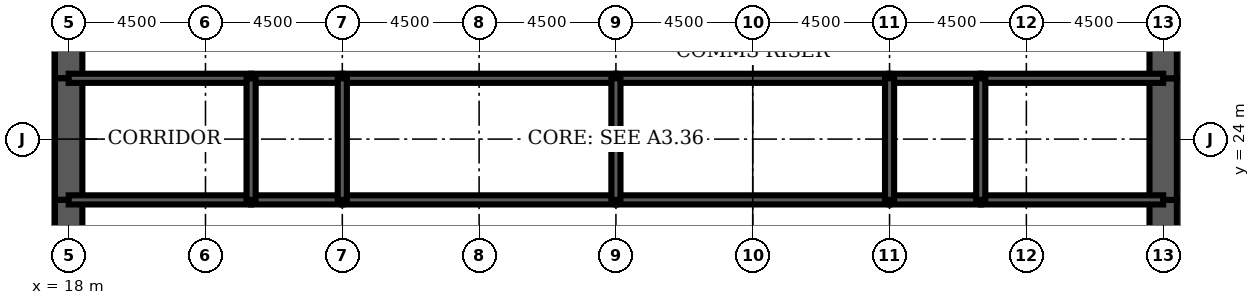
"""IFC4 building model, lengths in metres.
Left out: names, types, materials, properties, quantities, classifications, styles, units other than length and angle.
Written with IfcOpenShell. Run it as: python <this file> out.ifc"""

import sys

from ifc_helpers import new_model, si_unit, direction, frame, frame_2d, origin, place, context, subcontext, project, spatial, rectangle, extrude, element, fill, save


model = new_model("IFC4")
c1 = context("Model", 3, precision=1e-05, world=origin(), true_north=direction((0.0, 1.0)))
c2 = subcontext(c1, "Body", "Model", "MODEL_VIEW")
j1 = project(units=[si_unit("LENGTHUNIT", "METRE"), si_unit("PLANEANGLEUNIT", "RADIAN")], contexts=[c1])
p1 = place(None, origin())
s1 = spatial("IfcSite", under=j1, at=p1, CompositionType="ELEMENT")
p2 = place(p1, origin())
s2 = spatial("IfcBuilding", under=s1, at=p2, CompositionType="ELEMENT")
p3 = place(p2, frame((0.0, 0.0, 155.1)))
s3 = spatial("IfcBuildingStorey", under=s2, at=p3, CompositionType="ELEMENT", Elevation=155.1)
p4 = place(p3, frame((18.0, 28.8, 0.0), z_axis=(0.0, 0.0, 1.0), x_axis=(0.0, -1.0, 0.0)))
e1 = element("IfcWall", 1, at=p4, inside=s3, PredefinedType="SHEAR", context=c2, shape_type="SweptSolid", body=[
    extrude(rectangle(XDim=2.8, YDim=0.9, at=frame_2d((1.4, 0.0))), origin(), (0.0, 0.0, 1.0), 4.2),
])
p5 = place(p4, frame((0.4, 0.0, 0.0)))
e2 = element("IfcOpeningElement", 2, at=p5, cuts=e1, PredefinedType="OPENING", context=c2, shape_type="SweptSolid", body=[
    extrude(rectangle(XDim=1.8, YDim=2.1, at=frame_2d((0.9, 1.05))), frame((0.0, 0.46, 0.0), z_axis=(0.0, -1.0, 0.0), x_axis=(1.0, 0.0, 0.0)), (0.0, 0.0, 1.0), 0.92),
])
p6 = place(p3, frame((18.0, 26.0, 0.0), z_axis=(0.0, 0.0, 1.0), x_axis=(0.0, -1.0, 0.0)))
e3 = element("IfcWall", 3, at=p6, inside=s3, PredefinedType="SHEAR", context=c2, shape_type="SweptSolid", body=[
    extrude(rectangle(XDim=4.0, YDim=0.9, at=frame_2d((2.0, 0.0))), origin(), (0.0, 0.0, 1.0), 4.2),
])
p7 = place(p3, frame((18.0, 22.0, 0.0), z_axis=(0.0, 0.0, 1.0), x_axis=(0.0, -1.0, 0.0)))
e4 = element("IfcWall", 4, at=p7, inside=s3, PredefinedType="SHEAR", context=c2, shape_type="SweptSolid", body=[
    extrude(rectangle(XDim=2.8, YDim=0.9, at=frame_2d((1.4, 0.0))), origin(), (0.0, 0.0, 1.0), 4.2),
])
p8 = place(p7, frame((0.6, 0.0, 0.0)))
e5 = element("IfcOpeningElement", 5, at=p8, cuts=e4, PredefinedType="OPENING", context=c2, shape_type="SweptSolid", body=[
    extrude(rectangle(XDim=1.8, YDim=2.1, at=frame_2d((0.9, 1.05))), frame((0.0, 0.46, 0.0), z_axis=(0.0, -1.0, 0.0), x_axis=(1.0, 0.0, 0.0)), (0.0, 0.0, 1.0), 0.92),
])
p9 = place(p3, frame((54.0, 19.2, 0.0), z_axis=(0.0, 0.0, 1.0), x_axis=(0.0, 1.0, 0.0)))
e6 = element("IfcWall", 6, at=p9, inside=s3, PredefinedType="SHEAR", context=c2, shape_type="SweptSolid", body=[
    extrude(rectangle(XDim=2.8, YDim=0.9, at=frame_2d((1.4, 0.0))), origin(), (0.0, 0.0, 1.0), 4.2),
])
p10 = place(p9, frame((0.4, 0.0, 0.0)))
e7 = element("IfcOpeningElement", 7, at=p10, cuts=e6, PredefinedType="OPENING", context=c2, shape_type="SweptSolid", body=[
    extrude(rectangle(XDim=1.8, YDim=2.1, at=frame_2d((0.9, 1.05))), frame((0.0, 0.46, 0.0), z_axis=(0.0, -1.0, 0.0), x_axis=(1.0, 0.0, 0.0)), (0.0, 0.0, 1.0), 0.92),
])
p11 = place(p3, frame((54.0, 22.0, 0.0), z_axis=(0.0, 0.0, 1.0), x_axis=(0.0, 1.0, 0.0)))
e8 = element("IfcWall", 8, at=p11, inside=s3, PredefinedType="SHEAR", context=c2, shape_type="SweptSolid", body=[
    extrude(rectangle(XDim=4.0, YDim=0.9, at=frame_2d((2.0, 0.0))), origin(), (0.0, 0.0, 1.0), 4.2),
])
p12 = place(p3, frame((54.0, 26.0, 0.0), z_axis=(0.0, 0.0, 1.0), x_axis=(0.0, 1.0, 0.0)))
e9 = element("IfcWall", 9, at=p12, inside=s3, PredefinedType="SHEAR", context=c2, shape_type="SweptSolid", body=[
    extrude(rectangle(XDim=2.8, YDim=0.9, at=frame_2d((1.4, 0.0))), origin(), (0.0, 0.0, 1.0), 4.2),
])
p13 = place(p12, frame((0.6, 0.0, 0.0)))
e10 = element("IfcOpeningElement", 10, at=p13, cuts=e9, PredefinedType="OPENING", context=c2, shape_type="SweptSolid", body=[
    extrude(rectangle(XDim=1.8, YDim=2.1, at=frame_2d((0.9, 1.05))), frame((0.0, 0.46, 0.0), z_axis=(0.0, -1.0, 0.0), x_axis=(1.0, 0.0, 0.0)), (0.0, 0.0, 1.0), 0.92),
])
p14 = place(p3, frame((18.0, 22.0, 0.0), z_axis=(0.0, 0.0, 1.0), x_axis=(1.0, 0.0, 0.0)))
e11 = element("IfcWall", 11, at=p14, inside=s3, PredefinedType="SOLIDWALL", context=c2, shape_type="SweptSolid", body=[
    extrude(rectangle(XDim=6.0, YDim=0.3, at=frame_2d((3.0, 0.0))), origin(), (0.0, 0.0, 1.0), 4.2),
])
p15 = place(p14, frame((2.0, 0.0, 0.0)))
e12 = element("IfcOpeningElement", 12, at=p15, cuts=e11, PredefinedType="OPENING", context=c2, shape_type="SweptSolid", body=[
    extrude(rectangle(XDim=1.0, YDim=2.1, at=frame_2d((0.5, 1.05))), frame((0.0, 0.16, 0.0), z_axis=(0.0, -1.0, 0.0), x_axis=(1.0, 0.0, 0.0)), (0.0, 0.0, 1.0), 0.32),
])
p16 = place(p3, frame((24.0, 22.0, 0.0), z_axis=(0.0, 0.0, 1.0), x_axis=(1.0, 0.0, 0.0)))
e13 = element("IfcWall", 13, at=p16, inside=s3, PredefinedType="SOLIDWALL", context=c2, shape_type="SweptSolid", body=[
    extrude(rectangle(XDim=3.0, YDim=0.3, at=frame_2d((1.5, 0.0))), origin(), (0.0, 0.0, 1.0), 4.2),
])
p17 = place(p16, frame((1.0, 0.0, 0.0)))
e14 = element("IfcOpeningElement", 14, at=p17, cuts=e13, PredefinedType="OPENING", context=c2, shape_type="SweptSolid", body=[
    extrude(rectangle(XDim=1.0, YDim=2.1, at=frame_2d((0.5, 1.05))), frame((0.0, 0.16, 0.0), z_axis=(0.0, -1.0, 0.0), x_axis=(1.0, 0.0, 0.0)), (0.0, 0.0, 1.0), 0.32),
])
p18 = place(p3, frame((27.0, 22.0, 0.0), z_axis=(0.0, 0.0, 1.0), x_axis=(1.0, 0.0, 0.0)))
e15 = element("IfcWall", 15, at=p18, inside=s3, PredefinedType="SOLIDWALL", context=c2, shape_type="SweptSolid", body=[
    extrude(rectangle(XDim=9.0, YDim=0.3, at=frame_2d((4.5, 0.0))), origin(), (0.0, 0.0, 1.0), 4.2),
])
p19 = place(p18, frame((4.0, 0.0, 0.0)))
e16 = element("IfcOpeningElement", 16, at=p19, cuts=e15, PredefinedType="OPENING", context=c2, shape_type="SweptSolid", body=[
    extrude(rectangle(XDim=1.0, YDim=2.1, at=frame_2d((0.5, 1.05))), frame((0.0, 0.16, 0.0), z_axis=(0.0, -1.0, 0.0), x_axis=(1.0, 0.0, 0.0)), (0.0, 0.0, 1.0), 0.32),
])
p20 = place(p3, frame((36.0, 22.0, 0.0), z_axis=(0.0, 0.0, 1.0), x_axis=(1.0, 0.0, 0.0)))
e17 = element("IfcWall", 17, at=p20, inside=s3, PredefinedType="SOLIDWALL", context=c2, shape_type="SweptSolid", body=[
    extrude(rectangle(XDim=9.0, YDim=0.3, at=frame_2d((4.5, 0.0))), origin(), (0.0, 0.0, 1.0), 4.2),
])
p21 = place(p20, frame((4.0, 0.0, 0.0)))
e18 = element("IfcOpeningElement", 18, at=p21, cuts=e17, PredefinedType="OPENING", context=c2, shape_type="SweptSolid", body=[
    extrude(rectangle(XDim=1.0, YDim=2.1, at=frame_2d((0.5, 1.05))), frame((0.0, 0.16, 0.0), z_axis=(0.0, -1.0, 0.0), x_axis=(1.0, 0.0, 0.0)), (0.0, 0.0, 1.0), 0.32),
])
p22 = place(p3, frame((45.0, 22.0, 0.0), z_axis=(0.0, 0.0, 1.0), x_axis=(1.0, 0.0, 0.0)))
e19 = element("IfcWall", 19, at=p22, inside=s3, PredefinedType="SOLIDWALL", context=c2, shape_type="SweptSolid", body=[
    extrude(rectangle(XDim=3.0, YDim=0.3, at=frame_2d((1.5, 0.0))), origin(), (0.0, 0.0, 1.0), 4.2),
])
p23 = place(p22, frame((1.0, 0.0, 0.0)))
e20 = element("IfcOpeningElement", 20, at=p23, cuts=e19, PredefinedType="OPENING", context=c2, shape_type="SweptSolid", body=[
    extrude(rectangle(XDim=1.0, YDim=2.1, at=frame_2d((0.5, 1.05))), frame((0.0, 0.16, 0.0), z_axis=(0.0, -1.0, 0.0), x_axis=(1.0, 0.0, 0.0)), (0.0, 0.0, 1.0), 0.32),
])
p24 = place(p3, frame((48.0, 22.0, 0.0), z_axis=(0.0, 0.0, 1.0), x_axis=(1.0, 0.0, 0.0)))
e21 = element("IfcWall", 21, at=p24, inside=s3, PredefinedType="SOLIDWALL", context=c2, shape_type="SweptSolid", body=[
    extrude(rectangle(XDim=6.0, YDim=0.3, at=frame_2d((3.0, 0.0))), origin(), (0.0, 0.0, 1.0), 4.2),
])
p25 = place(p24, frame((2.0, 0.0, 0.0)))
e22 = element("IfcOpeningElement", 22, at=p25, cuts=e21, PredefinedType="OPENING", context=c2, shape_type="SweptSolid", body=[
    extrude(rectangle(XDim=1.0, YDim=2.1, at=frame_2d((0.5, 1.05))), frame((0.0, 0.16, 0.0), z_axis=(0.0, -1.0, 0.0), x_axis=(1.0, 0.0, 0.0)), (0.0, 0.0, 1.0), 0.32),
])
p26 = place(p24, frame((4.0, 0.0, 0.0)))
e23 = element("IfcOpeningElement", 23, at=p26, cuts=e21, PredefinedType="OPENING", context=c2, shape_type="SweptSolid", body=[
    extrude(rectangle(XDim=1.0, YDim=2.1, at=frame_2d((0.5, 1.05))), frame((0.0, 0.16, 0.0), z_axis=(0.0, -1.0, 0.0), x_axis=(1.0, 0.0, 0.0)), (0.0, 0.0, 1.0), 0.32),
])
p27 = place(p3, frame((18.0, 26.0, 0.0), z_axis=(0.0, 0.0, 1.0), x_axis=(1.0, 0.0, 0.0)))
e24 = element("IfcWall", 24, at=p27, inside=s3, PredefinedType="SOLIDWALL", context=c2, shape_type="SweptSolid", body=[
    extrude(rectangle(XDim=6.0, YDim=0.3, at=frame_2d((3.0, 0.0))), origin(), (0.0, 0.0, 1.0), 4.2),
])
p28 = place(p3, frame((24.0, 26.0, 0.0), z_axis=(0.0, 0.0, 1.0), x_axis=(1.0, 0.0, 0.0)))
e25 = element("IfcWall", 25, at=p28, inside=s3, PredefinedType="SOLIDWALL", context=c2, shape_type="SweptSolid", body=[
    extrude(rectangle(XDim=3.0, YDim=0.3, at=frame_2d((1.5, 0.0))), origin(), (0.0, 0.0, 1.0), 4.2),
])
for number, where, z_axis, x_axis in (
    (26, (27.0, 26.0, 0.0), (0.0, 0.0, 1.0), (1.0, 0.0, 0.0)),
    (27, (36.0, 26.0, 0.0), (0.0, 0.0, 1.0), (1.0, 0.0, 0.0)),
):
    element("IfcWall", number, at=place(p3, frame(where, z_axis=z_axis, x_axis=x_axis)), inside=s3, PredefinedType="SOLIDWALL", context=c2, shape_type="SweptSolid", body=[
        extrude(rectangle(XDim=9.0, YDim=0.3, at=frame_2d((4.5, 0.0))), origin(), (0.0, 0.0, 1.0), 4.2),
    ])
p29 = place(p3, frame((45.0, 26.0, 0.0), z_axis=(0.0, 0.0, 1.0), x_axis=(1.0, 0.0, 0.0)))
e28 = element("IfcWall", 28, at=p29, inside=s3, PredefinedType="SOLIDWALL", context=c2, shape_type="SweptSolid", body=[
    extrude(rectangle(XDim=3.0, YDim=0.3, at=frame_2d((1.5, 0.0))), origin(), (0.0, 0.0, 1.0), 4.2),
])
p30 = place(p3, frame((48.0, 26.0, 0.0), z_axis=(0.0, 0.0, 1.0), x_axis=(1.0, 0.0, 0.0)))
e29 = element("IfcWall", 29, at=p30, inside=s3, PredefinedType="SOLIDWALL", context=c2, shape_type="SweptSolid", body=[
    extrude(rectangle(XDim=6.0, YDim=0.3, at=frame_2d((3.0, 0.0))), origin(), (0.0, 0.0, 1.0), 4.2),
])
for number, where, z_axis, x_axis in (
    (30, (24.0, 22.0, 0.0), (0.0, 0.0, 1.0), (0.0, 1.0, 0.0)),
    (31, (27.0, 22.0, 0.0), (0.0, 0.0, 1.0), (0.0, 1.0, 0.0)),
    (32, (36.0, 22.0, 0.0), (0.0, 0.0, 1.0), (0.0, 1.0, 0.0)),
    (33, (45.0, 22.0, 0.0), (0.0, 0.0, 1.0), (0.0, 1.0, 0.0)),
    (34, (48.0, 22.0, 0.0), (0.0, 0.0, 1.0), (0.0, 1.0, 0.0)),
):
    element("IfcWall", number, at=place(p3, frame(where, z_axis=z_axis, x_axis=x_axis)), inside=s3, PredefinedType="SOLIDWALL", context=c2, shape_type="SweptSolid", body=[
        extrude(rectangle(XDim=4.0, YDim=0.3, at=frame_2d((2.0, 0.0))), origin(), (0.0, 0.0, 1.0), 4.2),
    ])
p31 = place(p3, frame((38.0, 22.15, 0.0), z_axis=(0.0, 0.0, 1.0), x_axis=(0.0, 1.0, 0.0)))
e35 = element("IfcWall", 35, at=p31, inside=s3, PredefinedType="PARTITIONING", context=c2, shape_type="SweptSolid", body=[
    extrude(rectangle(XDim=3.7, YDim=0.15, at=frame_2d((1.85, 0.0))), origin(), (0.0, 0.0, 1.0), 3.0),
])
p32 = place(p31, frame((2.2, 0.0, 0.0)))
e36 = element("IfcOpeningElement", 36, at=p32, cuts=e35, PredefinedType="OPENING", context=c2, shape_type="SweptSolid", body=[
    extrude(rectangle(XDim=1.0, YDim=2.1, at=frame_2d((0.5, 1.05))), frame((0.0, 0.085, 0.0), z_axis=(0.0, -1.0, 0.0), x_axis=(1.0, 0.0, 0.0)), (0.0, 0.0, 1.0), 0.17),
])
p33 = place(p3, frame((51.375, 22.15, 0.0), z_axis=(0.0, 0.0, 1.0), x_axis=(0.0, 1.0, 0.0)))
e37 = element("IfcWall", 37, at=p33, inside=s3, PredefinedType="PARTITIONING", context=c2, shape_type="SweptSolid", body=[
    extrude(rectangle(XDim=3.7, YDim=0.15, at=frame_2d((1.85, 0.0))), origin(), (0.0, 0.0, 1.0), 3.0),
])
p34 = place(p32, origin())
e38 = element("IfcDoor", 38, at=p34, inside=s3, OperationType="SINGLE_SWING_RIGHT", PredefinedType="DOOR", context=c2, shape_type="SweptSolid", body=[
    extrude(rectangle(XDim=1.0, YDim=2.1, at=frame_2d((0.5, 1.05))), frame((0.0, 0.025, 0.0), z_axis=(0.0, -1.0, 0.0), x_axis=(1.0, 0.0, 0.0)), (0.0, 0.0, 1.0), 0.05),
])
fill(e36, e38)
p35 = place(p8, origin())
e39 = element("IfcDoor", 39, at=p35, inside=s3, OperationType="SINGLE_SWING_LEFT", PredefinedType="DOOR", context=c2, shape_type="SweptSolid", body=[
    extrude(rectangle(XDim=1.8, YDim=2.1, at=frame_2d((0.9, 1.05))), frame((0.0, 0.45, 0.0), z_axis=(0.0, -1.0, 0.0), x_axis=(1.0, 0.0, 0.0)), (0.0, 0.0, 1.0), 0.899),
])
fill(e5, e39)
p36 = place(p5, origin())
e40 = element("IfcDoor", 40, at=p36, inside=s3, OperationType="SINGLE_SWING_LEFT", PredefinedType="DOOR", context=c2, shape_type="SweptSolid", body=[
    extrude(rectangle(XDim=1.8, YDim=2.1, at=frame_2d((0.9, 1.05))), frame((0.0, 0.45, 0.0), z_axis=(0.0, -1.0, 0.0), x_axis=(1.0, 0.0, 0.0)), (0.0, 0.0, 1.0), 0.899),
])
fill(e2, e40)
p37 = place(p10, origin())
e41 = element("IfcDoor", 41, at=p37, inside=s3, OperationType="SINGLE_SWING_LEFT", PredefinedType="DOOR", context=c2, shape_type="SweptSolid", body=[
    extrude(rectangle(XDim=1.8, YDim=2.1, at=frame_2d((0.9, 1.05))), frame((0.0, 0.45, 0.0), z_axis=(0.0, -1.0, 0.0), x_axis=(1.0, 0.0, 0.0)), (0.0, 0.0, 1.0), 0.899),
])
fill(e7, e41)
p38 = place(p13, origin())
e42 = element("IfcDoor", 42, at=p38, inside=s3, OperationType="SINGLE_SWING_LEFT", PredefinedType="DOOR", context=c2, shape_type="SweptSolid", body=[
    extrude(rectangle(XDim=1.8, YDim=2.1, at=frame_2d((0.9, 1.05))), frame((0.0, 0.45, 0.0), z_axis=(0.0, -1.0, 0.0), x_axis=(1.0, 0.0, 0.0)), (0.0, 0.0, 1.0), 0.899),
])
fill(e10, e42)
p39 = place(p15, origin())
e43 = element("IfcDoor", 43, at=p39, inside=s3, OperationType="SINGLE_SWING_LEFT", PredefinedType="DOOR", context=c2, shape_type="SweptSolid", body=[
    extrude(rectangle(XDim=1.0, YDim=2.1, at=frame_2d((0.5, 1.05))), frame((0.0, 0.025, 0.0), z_axis=(0.0, -1.0, 0.0), x_axis=(1.0, 0.0, 0.0)), (0.0, 0.0, 1.0), 0.05),
])
fill(e12, e43)
p40 = place(p17, origin())
e44 = element("IfcDoor", 44, at=p40, inside=s3, OperationType="SINGLE_SWING_LEFT", PredefinedType="DOOR", context=c2, shape_type="SweptSolid", body=[
    extrude(rectangle(XDim=1.0, YDim=2.1, at=frame_2d((0.5, 1.05))), frame((0.0, 0.025, 0.0), z_axis=(0.0, -1.0, 0.0), x_axis=(1.0, 0.0, 0.0)), (0.0, 0.0, 1.0), 0.05),
])
fill(e14, e44)
p41 = place(p19, origin())
e45 = element("IfcDoor", 45, at=p41, inside=s3, OperationType="SINGLE_SWING_LEFT", PredefinedType="DOOR", context=c2, shape_type="SweptSolid", body=[
    extrude(rectangle(XDim=1.0, YDim=2.1, at=frame_2d((0.5, 1.05))), frame((0.0, 0.025, 0.0), z_axis=(0.0, -1.0, 0.0), x_axis=(1.0, 0.0, 0.0)), (0.0, 0.0, 1.0), 0.05),
])
fill(e16, e45)
p42 = place(p21, origin())
e46 = element("IfcDoor", 46, at=p42, inside=s3, OperationType="SINGLE_SWING_LEFT", PredefinedType="DOOR", context=c2, shape_type="SweptSolid", body=[
    extrude(rectangle(XDim=1.0, YDim=2.1, at=frame_2d((0.5, 1.05))), frame((0.0, 0.025, 0.0), z_axis=(0.0, -1.0, 0.0), x_axis=(1.0, 0.0, 0.0)), (0.0, 0.0, 1.0), 0.05),
])
fill(e18, e46)
p43 = place(p23, origin())
e47 = element("IfcDoor", 47, at=p43, inside=s3, OperationType="SINGLE_SWING_LEFT", PredefinedType="DOOR", context=c2, shape_type="SweptSolid", body=[
    extrude(rectangle(XDim=1.0, YDim=2.1, at=frame_2d((0.5, 1.05))), frame((0.0, 0.025, 0.0), z_axis=(0.0, -1.0, 0.0), x_axis=(1.0, 0.0, 0.0)), (0.0, 0.0, 1.0), 0.05),
])
fill(e20, e47)
p44 = place(p25, origin())
e48 = element("IfcDoor", 48, at=p44, inside=s3, OperationType="SINGLE_SWING_LEFT", PredefinedType="DOOR", context=c2, shape_type="SweptSolid", body=[
    extrude(rectangle(XDim=1.0, YDim=2.1, at=frame_2d((0.5, 1.05))), frame((0.0, 0.025, 0.0), z_axis=(0.0, -1.0, 0.0), x_axis=(1.0, 0.0, 0.0)), (0.0, 0.0, 1.0), 0.05),
])
fill(e22, e48)
p45 = place(p26, origin())
e49 = element("IfcDoor", 49, at=p45, inside=s3, OperationType="SINGLE_SWING_RIGHT", PredefinedType="DOOR", context=c2, shape_type="SweptSolid", body=[
    extrude(rectangle(XDim=1.0, YDim=2.1, at=frame_2d((0.5, 1.05))), frame((0.0, 0.025, 0.0), z_axis=(0.0, -1.0, 0.0), x_axis=(1.0, 0.0, 0.0)), (0.0, 0.0, 1.0), 0.05),
])
fill(e23, e49)
save(model, sys.argv[1])
